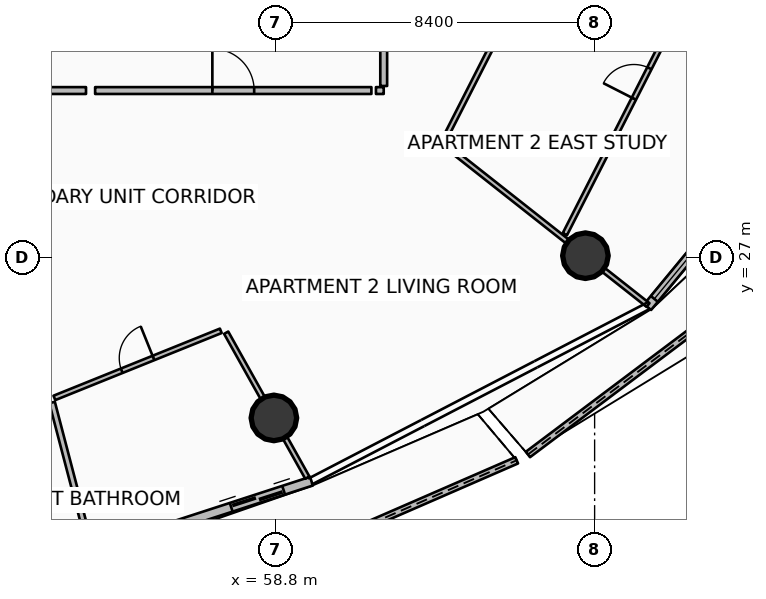
"""IFC4 building model, lengths in metres.
Left out: names, types, materials, properties, quantities, classifications, styles, units other than length and angle.
Written with IfcOpenShell. Run it as: python <this file> out.ifc"""

import sys

from ifc_helpers import new_model, si_unit, direction, frame, frame_2d, origin, origin_2d, place, context, subcontext, project, spatial, polyline, rectangle, circle, outline, extrude, element, fill, save


model = new_model("IFC4")
c1 = context("Model", 3, precision=1e-05, world=origin(), true_north=direction((0.0, 1.0)))
c2 = subcontext(c1, "Body", "Model", "MODEL_VIEW")
j1 = project(units=[si_unit("LENGTHUNIT", "METRE"), si_unit("PLANEANGLEUNIT", "RADIAN")], contexts=[c1])
p1 = place(None, origin())
s1 = spatial("IfcSite", under=j1, at=p1, CompositionType="ELEMENT")
p2 = place(p1, origin())
s2 = spatial("IfcBuilding", under=s1, at=p2, CompositionType="ELEMENT")
p3 = place(p2, frame((0.0, 0.0, 112.65)))
s3 = spatial("IfcBuildingStorey", under=s2, at=p3, CompositionType="ELEMENT", Elevation=112.65)
p4 = place(p3, frame((58.76, 22.786, 0.0), z_axis=(-0.132897442347, 0.237292682336, 0.962304760836), x_axis=(-0.872484791249, -0.488641268252, 0.0)))
e1 = element("IfcColumn", 1, at=p4, inside=s3, PredefinedType="COLUMN", context=c2, shape_type="SweptSolid", body=[
    extrude(circle(Radius=0.6, at=origin_2d()), origin(), (0.0, 0.0, 1.0), 3.606),
])
p5 = place(p3, frame((66.958, 27.055, 0.0), z_axis=(-0.23244676176, 0.183255946608, 0.95518886142), x_axis=(-0.619114149501, -0.785301005913, 0.0)))
e2 = element("IfcColumn", 2, at=p5, inside=s3, PredefinedType="COLUMN", context=c2, shape_type="SweptSolid", body=[
    extrude(circle(Radius=0.6, at=origin_2d()), origin(), (0.0, 0.0, 1.0), 3.633),
])
p6 = place(p3, frame((56.022, 17.698, 0.0), z_axis=(0.0, 0.0, 1.0), x_axis=(0.916910512906, 0.399092860527, 0.0)))
e3 = element("IfcWall", 3, at=p6, inside=s3, PredefinedType="PARAPET", context=c2, shape_type="SweptSolid", body=[
    extrude(outline(polyline([(0.0, 0.0), (9.955, 0.0), (9.955, 1.12), (4.977, 1.182), (0.0, 1.348), (0.0, 0.0)])), frame((0.0, 0.09, 0.0), z_axis=(0.0, -1.0, 0.0), x_axis=(1.0, 0.0, 0.0)), (0.0, 0.0, 1.0), 0.18),
])
p7 = place(p3, frame((65.446, 21.825, 0.0), z_axis=(0.0, 0.0, 1.0), x_axis=(0.799377932659, 0.600828528598, 0.0)))
e4 = element("IfcWall", 4, at=p7, inside=s3, PredefinedType="PARAPET", context=c2, shape_type="SweptSolid", body=[
    extrude(outline(polyline([(0.0, 0.0), (11.075, 0.0), (11.075, 1.348), (5.538, 1.182), (0.0, 1.12), (0.0, 0.0)])), frame((0.0, 0.09, 0.0), z_axis=(0.0, -1.0, 0.0), x_axis=(1.0, 0.0, 0.0)), (0.0, 0.0, 1.0), 0.18),
])
p8 = place(p3, frame((50.767, 18.203, 0.0), z_axis=(0.0, 0.0, 1.0), x_axis=(0.951052494852, 0.30902937083, 0.0)))
e5 = element("IfcWall", 5, at=p8, inside=s3, PredefinedType="SOLIDWALL", context=c2, shape_type="SweptSolid", body=[
    extrude(rectangle(XDim=9.444, YDim=0.24, at=frame_2d((4.722, 0.0))), origin(), (0.0, 0.0, 1.0), 2.42),
])
p9 = place(p8, frame((7.224, 0.0, 0.0)))
e6 = element("IfcOpeningElement", 6, at=p9, cuts=e5, PredefinedType="OPENING", context=c2, shape_type="SweptSolid", body=[
    extrude(rectangle(XDim=1.45, YDim=2.15, at=frame_2d((0.725, 1.075))), frame((0.0, 0.13, 0.0), z_axis=(0.0, -1.0, 0.0), x_axis=(1.0, 0.0, 0.0)), (0.0, 0.0, 1.0), 0.26),
])
p10 = place(p8, frame((0.28, 0.0, 0.65)))
e7 = element("IfcOpeningElement", 7, at=p10, cuts=e5, PredefinedType="OPENING", context=c2, shape_type="SweptSolid", body=[
    extrude(rectangle(XDim=1.6, YDim=1.5, at=frame_2d((0.8, 0.75))), frame((0.0, 0.13, 0.0), z_axis=(0.0, -1.0, 0.0), x_axis=(1.0, 0.0, 0.0)), (0.0, 0.0, 1.0), 0.26),
])
p11 = place(p3, frame((68.593, 25.702, 0.0), z_axis=(0.0, 0.0, 1.0), x_axis=(0.636704975, 0.771107498868, 0.0)))
e8 = element("IfcWall", 8, at=p11, inside=s3, PredefinedType="SOLIDWALL", context=c2, shape_type="SweptSolid", body=[
    extrude(rectangle(XDim=11.084, YDim=0.24, at=frame_2d((5.542, 0.0))), origin(), (0.0, 0.0, 1.0), 2.42),
])
p12 = place(p11, frame((8.864, 0.0, 0.0)))
e9 = element("IfcOpeningElement", 9, at=p12, cuts=e8, PredefinedType="OPENING", context=c2, shape_type="SweptSolid", body=[
    extrude(rectangle(XDim=1.45, YDim=2.15, at=frame_2d((0.725, 1.075))), frame((0.0, 0.13, 0.0), z_axis=(0.0, -1.0, 0.0), x_axis=(1.0, 0.0, 0.0)), (0.0, 0.0, 1.0), 0.26),
])
p13 = place(p11, frame((0.28, 0.0, 0.65)))
e10 = element("IfcOpeningElement", 10, at=p13, cuts=e8, PredefinedType="OPENING", context=c2, shape_type="SweptSolid", body=[
    extrude(rectangle(XDim=1.6, YDim=1.5, at=frame_2d((0.8, 0.75))), frame((0.0, 0.13, 0.0), z_axis=(0.0, -1.0, 0.0), x_axis=(1.0, 0.0, 0.0)), (0.0, 0.0, 1.0), 0.26),
])
p14 = place(p3, frame((54.056, 31.4, 0.0), z_axis=(0.0, 0.0, 1.0), x_axis=(1.0, 0.0, 0.0)))
e11 = element("IfcWall", 11, at=p14, inside=s3, PredefinedType="PARTITIONING", context=c2, shape_type="SweptSolid", body=[
    extrude(rectangle(XDim=7.27, YDim=0.18, at=frame_2d((3.635, 0.0))), origin(), (0.0, 0.0, 1.0), 2.427),
])
p15 = place(p14, frame((3.085, 0.0, 0.0)))
e12 = element("IfcOpeningElement", 12, at=p15, cuts=e11, PredefinedType="OPENING", context=c2, shape_type="SweptSolid", body=[
    extrude(rectangle(XDim=1.1, YDim=2.1, at=frame_2d((0.55, 1.05))), frame((0.0, 0.1, 0.0), z_axis=(0.0, -1.0, 0.0), x_axis=(1.0, 0.0, 0.0)), (0.0, 0.0, 1.0), 0.2),
])
p16 = place(p3, frame((49.375, 31.4, 0.0), z_axis=(0.0, 0.0, 1.0), x_axis=(1.0, 0.0, 0.0)))
e13 = element("IfcWall", 13, at=p16, inside=s3, PredefinedType="PARTITIONING", context=c2, shape_type="SweptSolid", body=[
    extrude(rectangle(XDim=4.442, YDim=0.18, at=frame_2d((2.221, 0.0))), origin(), (0.0, 0.0, 1.0), 2.427),
])
p17 = place(p3, frame((57.505, 25.028, 0.0), z_axis=(0.0, 0.0, 1.0), x_axis=(0.488618677979, -0.872497442707, 0.0)))
e14 = element("IfcWall", 14, at=p17, inside=s3, PredefinedType="PARTITIONING", context=c2, shape_type="SweptSolid", body=[
    extrude(rectangle(XDim=4.37, YDim=0.125, at=frame_2d((2.185, 0.0))), origin(), (0.0, 0.0, 1.0), 2.427),
])
p18 = place(p3, frame((52.924, 23.192, 0.0), z_axis=(0.0, 0.0, 1.0), x_axis=(0.253254995503, -0.967399559258, 0.0)))
e15 = element("IfcWall", 15, at=p18, inside=s3, PredefinedType="PARTITIONING", context=c2, shape_type="SweptSolid", body=[
    extrude(rectangle(XDim=3.96, YDim=0.15, at=frame_2d((1.98, 0.0))), origin(), (0.0, 0.0, 1.0), 2.445),
])
p19 = place(p3, frame((52.984, 23.312, 0.0), z_axis=(0.0, 0.0, 1.0), x_axis=(0.927438868519, 0.373974792145, 0.0)))
e16 = element("IfcWall", 16, at=p19, inside=s3, PredefinedType="PARTITIONING", context=c2, shape_type="SweptSolid", body=[
    extrude(rectangle(XDim=4.721, YDim=0.125, at=frame_2d((2.361, 0.0))), origin(), (0.0, 0.0, 1.0), 2.427),
])
p20 = place(p19, frame((1.911, 0.0, 0.0)))
e17 = element("IfcOpeningElement", 17, at=p20, cuts=e16, PredefinedType="OPENING", context=c2, shape_type="SweptSolid", body=[
    extrude(rectangle(XDim=0.9, YDim=2.08, at=frame_2d((0.45, 1.04))), frame((0.0, 0.073, 0.0), z_axis=(0.0, -1.0, 0.0), x_axis=(1.0, 0.0, 0.0)), (0.0, 0.0, 1.0), 0.145),
])
p21 = place(p3, frame((61.446, 31.4, 0.0), z_axis=(0.0, 0.0, 1.0), x_axis=(1.0, 0.0, 0.0)))
e18 = element("IfcWall", 18, at=p21, inside=s3, PredefinedType="PARTITIONING", context=c2, shape_type="SweptSolid", body=[
    extrude(rectangle(XDim=0.204, YDim=0.18, at=frame_2d((0.102, 0.0))), origin(), (0.0, 0.0, 1.0), 2.427),
])
p22 = place(p3, frame((61.65, 31.52, 0.0), z_axis=(0.0, 0.0, 1.0), x_axis=(0.0, 1.0, 0.0)))
e19 = element("IfcWall", 19, at=p22, inside=s3, PredefinedType="PARTITIONING", context=c2, shape_type="SweptSolid", body=[
    extrude(rectangle(XDim=6.51, YDim=0.18, at=frame_2d((3.255, 0.0))), origin(), (0.0, 0.0, 1.0), 2.427),
])
p23 = place(p3, frame((63.276, 29.958, 0.0), z_axis=(0.0, 0.0, 1.0), x_axis=(0.785296075508, -0.619120403308, 0.0)))
e20 = element("IfcWall", 20, at=p23, inside=s3, PredefinedType="PARTITIONING", context=c2, shape_type="SweptSolid", body=[
    extrude(rectangle(XDim=6.786, YDim=0.125, at=frame_2d((3.393, 0.0))), origin(), (0.0, 0.0, 1.0), 2.427),
])
p24 = place(p3, frame((63.247, 30.117, 0.0), z_axis=(0.0, 0.0, 1.0), x_axis=(0.453981156247, 0.891011284874, 0.0)))
e21 = element("IfcWall", 21, at=p24, inside=s3, PredefinedType="PARTITIONING", context=c2, shape_type="SweptSolid", body=[
    extrude(rectangle(XDim=7.331, YDim=0.125, at=frame_2d((3.666, 0.0))), origin(), (0.0, 0.0, 1.0), 2.427),
])
p25 = place(p24, frame((3.215, 0.0, 0.0)))
e22 = element("IfcOpeningElement", 22, at=p25, cuts=e21, PredefinedType="OPENING", context=c2, shape_type="SweptSolid", body=[
    extrude(rectangle(XDim=0.9, YDim=2.08, at=frame_2d((0.45, 1.04))), frame((0.0, 0.073, 0.0), z_axis=(0.0, -1.0, 0.0), x_axis=(1.0, 0.0, 0.0)), (0.0, 0.0, 1.0), 0.145),
])
p26 = place(p3, frame((66.416, 27.619, 0.0), z_axis=(0.0, 0.0, 1.0), x_axis=(0.453999703912, 0.891001834368, 0.0)))
e23 = element("IfcWall", 23, at=p26, inside=s3, PredefinedType="PARTITIONING", context=c2, shape_type="SweptSolid", body=[
    extrude(rectangle(XDim=8.905, YDim=0.125, at=frame_2d((4.453, 0.0))), origin(), (0.0, 0.0, 1.0), 2.427),
])
p27 = place(p26, frame((4.003, 0.0, 0.0)))
e24 = element("IfcOpeningElement", 24, at=p27, cuts=e23, PredefinedType="OPENING", context=c2, shape_type="SweptSolid", body=[
    extrude(rectangle(XDim=0.9, YDim=2.08, at=frame_2d((0.45, 1.04))), frame((0.0, 0.073, 0.0), z_axis=(0.0, -1.0, 0.0), x_axis=(1.0, 0.0, 0.0)), (0.0, 0.0, 1.0), 0.145),
])
p28 = place(p9, origin())
e25 = element("IfcDoor", 25, at=p28, inside=s3, OperationType="DOUBLE_DOOR_SLIDING", PredefinedType="DOOR", context=c2, shape_type="SweptSolid", body=[
    extrude(rectangle(XDim=1.45, YDim=2.15, at=frame_2d((0.725, 1.075))), frame((0.0, 0.025, 0.0), z_axis=(0.0, -1.0, 0.0), x_axis=(1.0, 0.0, 0.0)), (0.0, 0.0, 1.0), 0.05),
])
fill(e6, e25)
p29 = place(p13, origin())
e26 = element("IfcWindow", 26, at=p29, inside=s3, PartitioningType="SINGLE_PANEL", PredefinedType="WINDOW", context=c2, shape_type="SweptSolid", body=[
    extrude(rectangle(XDim=1.6, YDim=1.5, at=frame_2d((0.8, 0.75))), frame((0.0, 0.03, 0.0), z_axis=(0.0, -1.0, 0.0), x_axis=(1.0, 0.0, 0.0)), (0.0, 0.0, 1.0), 0.06),
])
fill(e10, e26)
p30 = place(p15, origin())
e27 = element("IfcDoor", 27, at=p30, inside=s3, OperationType="SINGLE_SWING_LEFT", PredefinedType="DOOR", context=c2, shape_type="SweptSolid", body=[
    extrude(rectangle(XDim=1.1, YDim=2.1, at=frame_2d((0.55, 1.05))), frame((0.0, 0.025, 0.0), z_axis=(0.0, -1.0, 0.0), x_axis=(1.0, 0.0, 0.0)), (0.0, 0.0, 1.0), 0.05),
])
fill(e12, e27)
p31 = place(p20, origin())
e28 = element("IfcDoor", 28, at=p31, inside=s3, OperationType="SINGLE_SWING_RIGHT", PredefinedType="DOOR", context=c2, shape_type="SweptSolid", body=[
    extrude(rectangle(XDim=0.9, YDim=2.08, at=frame_2d((0.45, 1.04))), frame((0.0, 0.025, 0.0), z_axis=(0.0, -1.0, 0.0), x_axis=(1.0, 0.0, 0.0)), (0.0, 0.0, 1.0), 0.05),
])
fill(e17, e28)
p32 = place(p27, origin())
e29 = element("IfcDoor", 29, at=p32, inside=s3, OperationType="SINGLE_SWING_LEFT", PredefinedType="DOOR", context=c2, shape_type="SweptSolid", body=[
    extrude(rectangle(XDim=0.9, YDim=2.08, at=frame_2d((0.45, 1.04))), frame((0.0, 0.025, 0.0), z_axis=(0.0, -1.0, 0.0), x_axis=(1.0, 0.0, 0.0)), (0.0, 0.0, 1.0), 0.05),
])
fill(e24, e29)
save(model, sys.argv[1])
